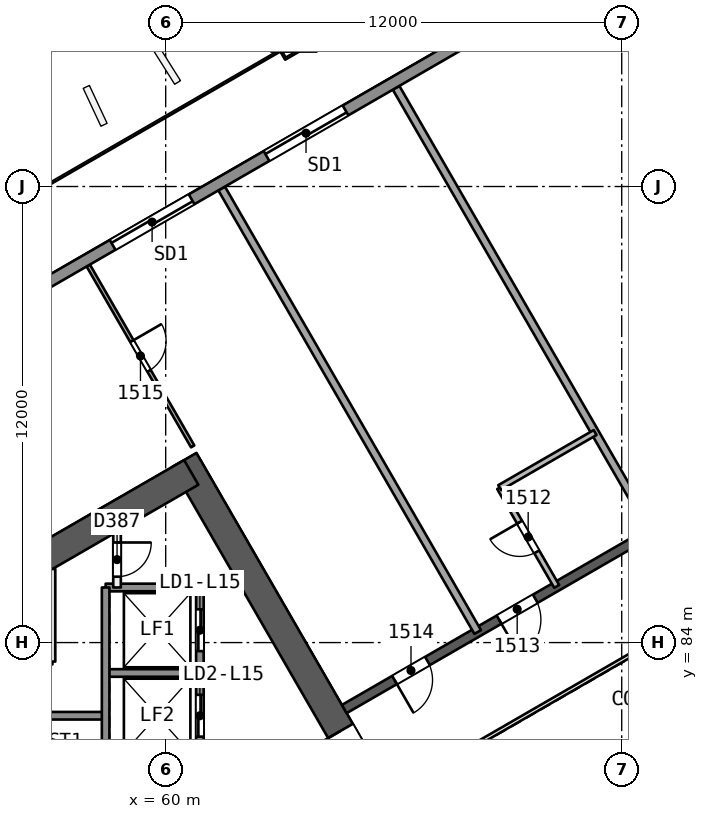
"""IFC4 building model, lengths in metres.
Left out: names, types, materials, properties, quantities, classifications, styles, units other than length and angle.
Written with IfcOpenShell. Run it as: python <this file> out.ifc"""

import sys

from ifc_helpers import new_model, si_unit, direction, frame, frame_2d, origin, origin_2d, place, context, subcontext, project, spatial, rectangle, extrude, element, fill, save


model = new_model("IFC4")
c1 = context("Model", 3, precision=1e-05, world=origin(), true_north=direction((0.0, 1.0)))
c2 = subcontext(c1, "Body", "Model", "MODEL_VIEW")
j1 = project(units=[si_unit("LENGTHUNIT", "METRE"), si_unit("PLANEANGLEUNIT", "RADIAN")], contexts=[c1])
p1 = place(None, origin())
s1 = spatial("IfcSite", under=j1, at=p1, CompositionType="ELEMENT")
p2 = place(p1, origin())
s2 = spatial("IfcBuilding", under=s1, at=p2, CompositionType="ELEMENT")
p3 = place(p2, frame((0.0, 0.0, 68.4)))
s3 = spatial("IfcBuildingStorey", under=s2, at=p3, CompositionType="ELEMENT", Elevation=68.4)
p4 = place(p3, frame((65.567, 80.0, 0.0), z_axis=(0.0, 0.0, 1.0), x_axis=(-0.499988615364, 0.866031976607, 0.0)))
e1 = element("IfcWall", 1, at=p4, inside=s3, PredefinedType="SHEAR", context=c2, shape_type="SweptSolid", body=[
    extrude(rectangle(XDim=10.163, YDim=0.75, at=frame_2d((5.082, 0.0))), origin(), (0.0, 0.0, 1.0), 3.7),
])
p5 = place(p4, frame((0.733, 0.0, 0.0)))
e2 = element("IfcOpeningElement", 2, at=p5, cuts=e1, PredefinedType="OPENING", context=c2, shape_type="SweptSolid", body=[
    extrude(rectangle(XDim=1.2, YDim=2.1, at=frame_2d((0.6, 1.05))), frame((0.0, 0.385, 0.0), z_axis=(0.0, -1.0, 0.0), x_axis=(1.0, 0.0, 0.0)), (0.0, 0.0, 1.0), 0.771),
])
p6 = place(p3, frame((60.673, 88.477, 0.0), z_axis=(0.0, 0.0, 1.0), x_axis=(-0.8660248072, -0.500001033313, 0.0)))
e3 = element("IfcWall", 3, at=p6, inside=s3, PredefinedType="SHEAR", context=c2, shape_type="SweptSolid", body=[
    extrude(rectangle(XDim=13.958, YDim=0.75, at=frame_2d((6.979, 0.0))), origin(), (0.0, 0.0, 1.0), 3.7),
])
p7 = place(p3, frame((78.2, 90.046, 0.0), z_axis=(0.0, 0.0, 1.0), x_axis=(-0.866026492143, -0.499998114903, 0.0)))
e4 = element("IfcWall", 4, at=p7, inside=s3, PredefinedType="SHEAR", context=c2, shape_type="SweptSolid", body=[
    extrude(rectangle(XDim=15.588, YDim=0.25, at=frame_2d((7.794, 0.0))), origin(), (0.0, 0.0, 1.0), 3.2),
])
p8 = place(p7, frame((4.718, 0.0, 0.0)))
e5 = element("IfcOpeningElement", 5, at=p8, cuts=e4, PredefinedType="OPENING", context=c2, shape_type="SweptSolid", body=[
    extrude(rectangle(XDim=1.0, YDim=2.1, at=frame_2d((0.5, 1.05))), frame((0.0, 0.135, 0.0), z_axis=(0.0, -1.0, 0.0), x_axis=(1.0, 0.0, 0.0)), (0.0, 0.0, 1.0), 0.271),
])
p9 = place(p7, frame((9.785, 0.0, 0.0)))
e6 = element("IfcOpeningElement", 6, at=p9, cuts=e4, PredefinedType="OPENING", context=c2, shape_type="SweptSolid", body=[
    extrude(rectangle(XDim=1.1, YDim=2.1, at=frame_2d((0.55, 1.05))), frame((0.0, 0.135, 0.0), z_axis=(0.0, -1.0, 0.0), x_axis=(1.0, 0.0, 0.0)), (0.0, 0.0, 1.0), 0.271),
])
p10 = place(p7, frame((13.062, 0.0, 0.0)))
e7 = element("IfcOpeningElement", 7, at=p10, cuts=e4, PredefinedType="OPENING", context=c2, shape_type="SweptSolid", body=[
    extrude(rectangle(XDim=1.0, YDim=2.1, at=frame_2d((0.5, 1.05))), frame((0.0, 0.135, 0.0), z_axis=(0.0, -1.0, 0.0), x_axis=(1.0, 0.0, 0.0)), (0.0, 0.0, 1.0), 0.271),
])
p11 = place(p3, frame((63.363, 100.156, 0.0), z_axis=(0.010092954999, -0.017481261926, 0.999796248113), x_axis=(0.866020200589, 0.50000901209, 8.5611e-08)))
e8 = element("IfcColumn", 8, at=p11, inside=s3, PredefinedType="COLUMN", context=c2, shape_type="SweptSolid", body=[
    extrude(rectangle(XDim=1.1, YDim=1.1, at=origin_2d()), origin(), (0.0, 0.0, 1.0), 3.701),
])
p12 = place(p3, frame((66.062, 98.599, 0.0), z_axis=(0.0, 0.0, 1.0), x_axis=(0.500006826849, -0.866021462265, 0.0)))
e9 = element("IfcWall", 9, at=p12, inside=s3, PredefinedType="PARTITIONING", context=c2, shape_type="SweptSolid", body=[
    extrude(rectangle(XDim=13.476, YDim=0.2, at=frame_2d((6.738, 0.0))), origin(), (0.0, 0.0, 1.0), 3.2),
])
p13 = place(p3, frame((70.289, 85.478, 0.0), z_axis=(0.0, 0.0, 1.0), x_axis=(-0.50002537861, 0.866010750942, 0.0)))
e10 = element("IfcWall", 10, at=p13, inside=s3, PredefinedType="PARTITIONING", context=c2, shape_type="SweptSolid", body=[
    extrude(rectangle(XDim=3.0, YDim=0.15, at=frame_2d((1.5, 0.0))), origin(), (0.0, 0.0, 1.0), 3.2),
])
p14 = place(p13, frame((1.05, 0.0, 0.0)))
e11 = element("IfcOpeningElement", 11, at=p14, cuts=e10, PredefinedType="OPENING", context=c2, shape_type="SweptSolid", body=[
    extrude(rectangle(XDim=0.9, YDim=2.1, at=frame_2d((0.45, 1.05))), frame((0.0, 0.085, 0.0), z_axis=(0.0, -1.0, 0.0), x_axis=(1.0, 0.0, 0.0)), (0.0, 0.0, 1.0), 0.171),
])
p15 = place(p3, frame((68.789, 88.076, 0.0), z_axis=(0.0, 0.0, 1.0), x_axis=(0.865996321171, 0.50005036918, 0.0)))
e12 = element("IfcWall", 12, at=p15, inside=s3, PredefinedType="PARTITIONING", context=c2, shape_type="SweptSolid", body=[
    extrude(rectangle(XDim=2.9, YDim=0.15, at=frame_2d((1.45, 0.0))), origin(), (0.0, 0.0, 1.0), 3.2),
])
p16 = place(p3, frame((61.472, 95.948, 0.0), z_axis=(0.0, 0.0, 1.0), x_axis=(0.499993239154, -0.866029307125, 0.0)))
e13 = element("IfcWall", 13, at=p16, inside=s3, PredefinedType="PARTITIONING", context=c2, shape_type="SweptSolid", body=[
    extrude(rectangle(XDim=13.476, YDim=0.2, at=frame_2d((6.738, 0.0))), origin(), (0.0, 0.0, 1.0), 3.2),
])
p17 = place(p3, frame((57.962, 93.922, 0.0), z_axis=(0.0, 0.0, 1.0), x_axis=(0.499974920023, -0.866039883231, 0.0)))
e14 = element("IfcWall", 14, at=p17, inside=s3, PredefinedType="PARTITIONING", context=c2, shape_type="SweptSolid", body=[
    extrude(rectangle(XDim=5.497, YDim=0.1, at=frame_2d((2.749, 0.0))), origin(), (0.0, 0.0, 1.0), 3.2),
])
p18 = place(p17, frame((2.298, 0.0, 0.0)))
e15 = element("IfcOpeningElement", 15, at=p18, cuts=e14, PredefinedType="OPENING", context=c2, shape_type="SweptSolid", body=[
    extrude(rectangle(XDim=0.9, YDim=2.1, at=frame_2d((0.45, 1.05))), frame((0.0, 0.061, 0.0), z_axis=(0.0, -1.0, 0.0), x_axis=(1.0, 0.0, 0.0)), (0.0, 0.0, 1.0), 0.121),
])
p19 = place(p3, frame((38.832, 83.049, 0.0), z_axis=(0.0, 0.0, 1.0), x_axis=(0.866024382485, 0.500001768939, 0.0)))
e16 = element("IfcWall", 16, at=p19, inside=s3, PredefinedType="SOLIDWALL", context=c2, shape_type="SweptSolid", body=[
    extrude(rectangle(XDim=59.596, YDim=0.3, at=frame_2d((29.798, 0.0))), origin(), (0.0, 0.0, 1.0), 3.2),
])
p20 = place(p19, frame((27.507, 0.0, 0.0)))
e17 = element("IfcOpeningElement", 17, at=p20, cuts=e16, PredefinedType="OPENING", context=c2, shape_type="SweptSolid", body=[
    extrude(rectangle(XDim=2.4, YDim=2.4, at=frame_2d((1.2, 1.2))), frame((0.0, 0.161, 0.0), z_axis=(0.0, -1.0, 0.0), x_axis=(1.0, 0.0, 0.0)), (0.0, 0.0, 1.0), 0.321),
])
p21 = place(p19, frame((22.83, 0.0, 0.0)))
e18 = element("IfcOpeningElement", 18, at=p21, cuts=e16, PredefinedType="OPENING", context=c2, shape_type="SweptSolid", body=[
    extrude(rectangle(XDim=2.4, YDim=2.4, at=frame_2d((1.2, 1.2))), frame((0.0, 0.161, 0.0), z_axis=(0.0, -1.0, 0.0), x_axis=(1.0, 0.0, 0.0)), (0.0, 0.0, 1.0), 0.321),
])
p22 = place(p19, frame((10.995, 0.0, 0.0)))
e19 = element("IfcOpeningElement", 19, at=p22, cuts=e16, PredefinedType="OPENING", context=c2, shape_type="SweptSolid", body=[
    extrude(rectangle(XDim=2.4, YDim=2.4, at=frame_2d((1.2, 1.2))), frame((0.0, 0.161, 0.0), z_axis=(0.0, -1.0, 0.0), x_axis=(1.0, 0.0, 0.0)), (0.0, 0.0, 1.0), 0.321),
])
p23 = place(p19, frame((44.32, 0.0, 0.0)))
e20 = element("IfcOpeningElement", 20, at=p23, cuts=e16, PredefinedType="OPENING", context=c2, shape_type="SweptSolid", body=[
    extrude(rectangle(XDim=2.4, YDim=2.4, at=frame_2d((1.2, 1.2))), frame((0.0, 0.161, 0.0), z_axis=(0.0, -1.0, 0.0), x_axis=(1.0, 0.0, 0.0)), (0.0, 0.0, 1.0), 0.321),
])
p24 = place(p3, frame((60.9, 85.45, 0.0), z_axis=(0.0, 0.0, 1.0), x_axis=(-1.0, 0.0, 0.0)))
e21 = element("IfcWall", 21, at=p24, inside=s3, PredefinedType="SOLIDWALL", context=c2, shape_type="SweptSolid", body=[
    extrude(rectangle(XDim=2.48, YDim=0.2, at=frame_2d((1.24, 0.0))), origin(), (0.0, 0.0, 1.0), 3.2),
])
p25 = place(p3, frame((57.02, 83.5, 0.0), z_axis=(0.0, 0.0, 1.0), x_axis=(-1.0, 0.0, 0.0)))
e22 = element("IfcWall", 22, at=p25, inside=s3, PredefinedType="PARTITIONING", context=c2, shape_type="SweptSolid", body=[
    extrude(rectangle(XDim=1.6, YDim=0.15, at=frame_2d((0.8, 0.0))), origin(), (0.0, 0.0, 1.0), 3.2),
])
p26 = place(p25, frame((0.387, 0.0, 0.0)))
e23 = element("IfcOpeningElement", 23, at=p26, cuts=e22, PredefinedType="OPENING", context=c2, shape_type="SweptSolid", body=[
    extrude(rectangle(XDim=0.9, YDim=2.1, at=frame_2d((0.45, 1.05))), frame((0.0, 0.085, 0.0), z_axis=(0.0, -1.0, 0.0), x_axis=(1.0, 0.0, 0.0)), (0.0, 0.0, 1.0), 0.171),
])
p27 = place(p3, frame((60.9, 83.2, 0.0), z_axis=(0.0, 0.0, 1.0), x_axis=(-1.0, 0.0, 0.0)))
e24 = element("IfcWall", 24, at=p27, inside=s3, PredefinedType="SOLIDWALL", context=c2, shape_type="SweptSolid", body=[
    extrude(rectangle(XDim=2.48, YDim=0.2, at=frame_2d((1.24, 0.0))), origin(), (0.0, 0.0, 1.0), 3.2),
])
p28 = place(p3, frame((58.42, 82.075, 0.0), z_axis=(0.0, 0.0, 1.0), x_axis=(-1.0, 0.0, 0.0)))
e25 = element("IfcWall", 25, at=p28, inside=s3, PredefinedType="SOLIDWALL", context=c2, shape_type="SweptSolid", body=[
    extrude(rectangle(XDim=7.7, YDim=0.2, at=frame_2d((3.85, 0.0))), origin(), (0.0, 0.0, 1.0), 3.2),
])
p29 = place(p3, frame((60.9, 85.45, 0.0), z_axis=(0.0, 0.0, 1.0), x_axis=(0.0, -1.0, 0.0)))
e26 = element("IfcWall", 26, at=p29, inside=s3, PredefinedType="SOLIDWALL", context=c2, shape_type="SweptSolid", body=[
    extrude(rectangle(XDim=10.9, YDim=0.2, at=frame_2d((5.45, 0.0))), origin(), (0.0, 0.0, 1.0), 3.2),
])
p30 = place(p29, frame((0.575, 0.0, 0.0)))
e27 = element("IfcOpeningElement", 27, at=p30, cuts=e26, PredefinedType="OPENING", context=c2, shape_type="SweptSolid", body=[
    extrude(rectangle(XDim=1.1, YDim=2.1, at=frame_2d((0.55, 1.05))), frame((0.0, 0.11, 0.0), z_axis=(0.0, -1.0, 0.0), x_axis=(1.0, 0.0, 0.0)), (0.0, 0.0, 1.0), 0.221),
])
p31 = place(p29, frame((2.825, 0.0, 0.0)))
e28 = element("IfcOpeningElement", 28, at=p31, cuts=e26, PredefinedType="OPENING", context=c2, shape_type="SweptSolid", body=[
    extrude(rectangle(XDim=1.1, YDim=2.1, at=frame_2d((0.55, 1.05))), frame((0.0, 0.11, 0.0), z_axis=(0.0, -1.0, 0.0), x_axis=(1.0, 0.0, 0.0)), (0.0, 0.0, 1.0), 0.221),
])
p32 = place(p29, frame((5.075, 0.0, 0.0)))
e29 = element("IfcOpeningElement", 29, at=p32, cuts=e26, PredefinedType="OPENING", context=c2, shape_type="SweptSolid", body=[
    extrude(rectangle(XDim=1.1, YDim=2.1, at=frame_2d((0.55, 1.05))), frame((0.0, 0.11, 0.0), z_axis=(0.0, -1.0, 0.0), x_axis=(1.0, 0.0, 0.0)), (0.0, 0.0, 1.0), 0.221),
])
p33 = place(p29, frame((7.325, 0.0, 0.0)))
e30 = element("IfcOpeningElement", 30, at=p33, cuts=e26, PredefinedType="OPENING", context=c2, shape_type="SweptSolid", body=[
    extrude(rectangle(XDim=1.1, YDim=2.1, at=frame_2d((0.55, 1.05))), frame((0.0, 0.11, 0.0), z_axis=(0.0, -1.0, 0.0), x_axis=(1.0, 0.0, 0.0)), (0.0, 0.0, 1.0), 0.221),
])
p34 = place(p3, frame((58.72, 86.917, 0.0), z_axis=(0.0, 0.0, 1.0), x_axis=(0.0, -1.0, 0.0)))
e31 = element("IfcWall", 31, at=p34, inside=s3, PredefinedType="PARTITIONING", context=c2, shape_type="SweptSolid", body=[
    extrude(rectangle(XDim=1.467, YDim=0.2, at=frame_2d((0.733, 0.0))), origin(), (0.0, 0.0, 1.0), 3.2),
])
p35 = place(p34, frame((0.283, 0.0, 0.0)))
e32 = element("IfcOpeningElement", 32, at=p35, cuts=e31, PredefinedType="OPENING", context=c2, shape_type="SweptSolid", body=[
    extrude(rectangle(XDim=0.9, YDim=2.1, at=frame_2d((0.45, 1.05))), frame((0.0, 0.11, 0.0), z_axis=(0.0, -1.0, 0.0), x_axis=(1.0, 0.0, 0.0)), (0.0, 0.0, 1.0), 0.221),
])
p36 = place(p3, frame((58.42, 85.45, 0.0), z_axis=(0.0, 0.0, 1.0), x_axis=(0.0, -1.0, 0.0)))
e33 = element("IfcWall", 33, at=p36, inside=s3, PredefinedType="SOLIDWALL", context=c2, shape_type="SweptSolid", body=[
    extrude(rectangle(XDim=9.0, YDim=0.2, at=frame_2d((4.5, 0.0))), origin(), (0.0, 0.0, 1.0), 3.2),
])
p37 = place(p3, frame((57.02, 85.935, 0.0), z_axis=(0.0, 0.0, 1.0), x_axis=(0.0, -1.0, 0.0)))
e34 = element("IfcWall", 34, at=p37, inside=s3, PredefinedType="PARTITIONING", context=c2, shape_type="SweptSolid", body=[
    extrude(rectangle(XDim=2.435, YDim=0.15, at=frame_2d((1.218, 0.0))), origin(), (0.0, 0.0, 1.0), 3.2),
])
p38 = place(p3, frame((77.738, 86.846, 0.0), z_axis=(0.0, 0.0, 1.0), x_axis=(-0.866026658274, -0.499997827154, 0.0)))
e35 = element("IfcWall", 35, at=p38, inside=s3, PredefinedType="PARTITIONING", context=c2, shape_type="SweptSolid", body=[
    extrude(rectangle(XDim=11.588, YDim=0.1, at=frame_2d((5.794, 0.0))), origin(), (0.0, 0.0, 1.0), 3.2),
])
p39 = place(p14, origin())
e36 = element("IfcDoor", 36, at=p39, inside=s3, OperationType="SINGLE_SWING_RIGHT", PredefinedType="NOTDEFINED", context=c2, shape_type="SweptSolid", body=[
    extrude(rectangle(XDim=0.9, YDim=2.1, at=frame_2d((0.45, 1.05))), frame((0.0, 0.025, 0.0), z_axis=(0.0, -1.0, 0.0), x_axis=(1.0, 0.0, 0.0)), (0.0, 0.0, 1.0), 0.05),
])
fill(e11, e36)
p40 = place(p9, origin())
e37 = element("IfcDoor", 37, at=p40, inside=s3, OperationType="SINGLE_SWING_RIGHT", PredefinedType="NOTDEFINED", context=c2, shape_type="SweptSolid", body=[
    extrude(rectangle(XDim=1.1, YDim=2.1, at=frame_2d((0.55, 1.05))), frame((0.0, 0.025, 0.0), z_axis=(0.0, -1.0, 0.0), x_axis=(1.0, 0.0, 0.0)), (0.0, 0.0, 1.0), 0.05),
])
fill(e6, e37)
p41 = place(p10, origin())
e38 = element("IfcDoor", 38, at=p41, inside=s3, OperationType="SINGLE_SWING_RIGHT", PredefinedType="NOTDEFINED", context=c2, shape_type="SweptSolid", body=[
    extrude(rectangle(XDim=1.0, YDim=2.1, at=frame_2d((0.5, 1.05))), frame((0.0, 0.025, 0.0), z_axis=(0.0, -1.0, 0.0), x_axis=(1.0, 0.0, 0.0)), (0.0, 0.0, 1.0), 0.05),
])
fill(e7, e38)
p42 = place(p18, origin())
e39 = element("IfcDoor", 39, at=p42, inside=s3, OperationType="SINGLE_SWING_LEFT", PredefinedType="NOTDEFINED", context=c2, shape_type="SweptSolid", body=[
    extrude(rectangle(XDim=0.9, YDim=2.1, at=frame_2d((0.45, 1.05))), frame((0.0, 0.025, 0.0), z_axis=(0.0, -1.0, 0.0), x_axis=(1.0, 0.0, 0.0)), (0.0, 0.0, 1.0), 0.05),
])
fill(e15, e39)
p43 = place(p20, origin())
e40 = element("IfcDoor", 40, at=p43, inside=s3, OperationType="SLIDING_TO_LEFT", PredefinedType="NOTDEFINED", context=c2, shape_type="SweptSolid", body=[
    extrude(rectangle(XDim=2.4, YDim=2.4, at=frame_2d((1.2, 1.2))), frame((0.0, 0.025, 0.0), z_axis=(0.0, -1.0, 0.0), x_axis=(1.0, 0.0, 0.0)), (0.0, 0.0, 1.0), 0.05),
])
fill(e17, e40)
p44 = place(p21, origin())
e41 = element("IfcDoor", 41, at=p44, inside=s3, OperationType="SLIDING_TO_RIGHT", PredefinedType="NOTDEFINED", context=c2, shape_type="SweptSolid", body=[
    extrude(rectangle(XDim=2.4, YDim=2.4, at=frame_2d((1.2, 1.2))), frame((0.0, 0.025, 0.0), z_axis=(0.0, -1.0, 0.0), x_axis=(1.0, 0.0, 0.0)), (0.0, 0.0, 1.0), 0.05),
])
fill(e18, e41)
p45 = place(p5, origin())
e42 = element("IfcDoor", 42, at=p45, inside=s3, OperationType="SINGLE_SWING_RIGHT", PredefinedType="NOTDEFINED", context=c2, shape_type="SweptSolid", body=[
    extrude(rectangle(XDim=1.2, YDim=2.1, at=frame_2d((0.6, 1.05))), frame((0.0, 0.025, 0.0), z_axis=(0.0, -1.0, 0.0), x_axis=(1.0, 0.0, 0.0)), (0.0, 0.0, 1.0), 0.05),
])
fill(e2, e42)
p46 = place(p30, origin())
e43 = element("IfcDoor", 43, at=p46, inside=s3, OperationType="SLIDING_TO_RIGHT", PredefinedType="NOTDEFINED", context=c2, shape_type="SweptSolid", body=[
    extrude(rectangle(XDim=1.1, YDim=2.1, at=frame_2d((0.55, 1.05))), frame((0.0, 0.025, 0.0), z_axis=(0.0, -1.0, 0.0), x_axis=(1.0, 0.0, 0.0)), (0.0, 0.0, 1.0), 0.05),
])
fill(e27, e43)
p47 = place(p31, origin())
e44 = element("IfcDoor", 44, at=p47, inside=s3, OperationType="SLIDING_TO_LEFT", PredefinedType="NOTDEFINED", context=c2, shape_type="SweptSolid", body=[
    extrude(rectangle(XDim=1.1, YDim=2.1, at=frame_2d((0.55, 1.05))), frame((0.0, 0.025, 0.0), z_axis=(0.0, -1.0, 0.0), x_axis=(1.0, 0.0, 0.0)), (0.0, 0.0, 1.0), 0.05),
])
fill(e28, e44)
p48 = place(p35, origin())
e45 = element("IfcDoor", 45, at=p48, inside=s3, OperationType="SINGLE_SWING_LEFT", PredefinedType="NOTDEFINED", context=c2, shape_type="SweptSolid", body=[
    extrude(rectangle(XDim=0.9, YDim=2.1, at=frame_2d((0.45, 1.05))), frame((0.0, 0.025, 0.0), z_axis=(0.0, -1.0, 0.0), x_axis=(1.0, 0.0, 0.0)), (0.0, 0.0, 1.0), 0.05),
])
fill(e32, e45)
save(model, sys.argv[1])
